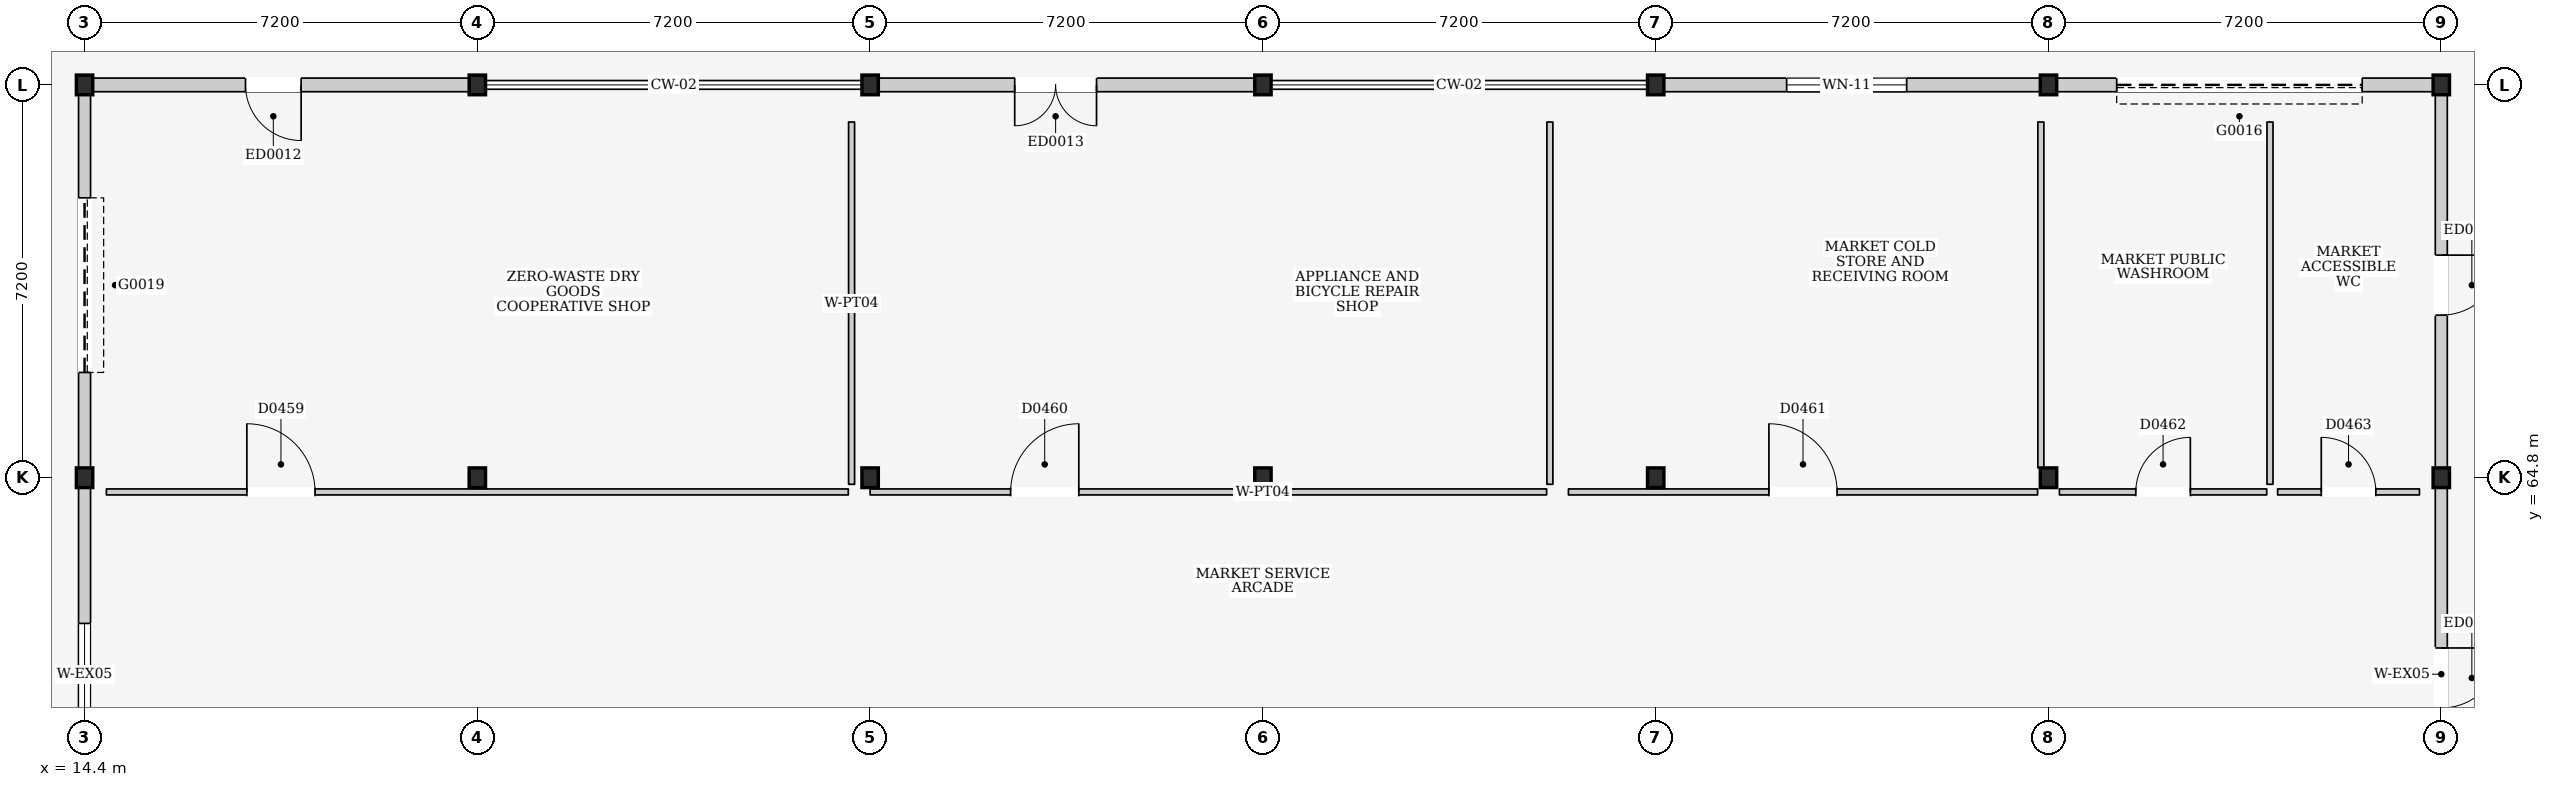
"""IFC4 building model, lengths in metres.
Left out: names, types, materials, properties, quantities, classifications, styles, units other than length and angle.
Written with IfcOpenShell. Run it as: python <this file> out.ifc"""

import sys

from ifc_helpers import new_model, si_unit, direction, frame, frame_2d, origin, origin_2d, place, context, subcontext, project, spatial, rectangle, i_section, extrude, element, fill, save


model = new_model("IFC4")
c1 = context("Model", 3, precision=1e-05, world=origin(), true_north=direction((0.0, 1.0)))
c2 = subcontext(c1, "Body", "Model", "MODEL_VIEW")
j1 = project(units=[si_unit("LENGTHUNIT", "METRE"), si_unit("PLANEANGLEUNIT", "RADIAN")], contexts=[c1])
p1 = place(None, origin())
s1 = spatial("IfcSite", under=j1, at=p1, CompositionType="ELEMENT")
p2 = place(p1, origin())
s2 = spatial("IfcBuilding", under=s1, at=p2, CompositionType="ELEMENT")
p3 = place(p2, origin())
s3 = spatial("IfcBuildingStorey", under=s2, at=p3, CompositionType="ELEMENT", Elevation=0.0)
for number, where, z_axis, x_axis in (
    (1, (14.4, 64.8, 0.0), (0.0, 0.0, 1.0), (1.0, 0.0, 0.0)),
    (2, (14.4, 72.0, 0.0), (0.0, 0.0, 1.0), (1.0, 0.0, 0.0)),
    (3, (21.6, 64.8, 0.0), (0.0, 0.0, 1.0), (1.0, 0.0, 0.0)),
    (4, (21.6, 72.0, 0.0), (0.0, 0.0, 1.0), (1.0, 0.0, 0.0)),
    (5, (28.8, 64.8, 0.0), (0.0, 0.0, 1.0), (1.0, 0.0, 0.0)),
    (6, (28.8, 72.0, 0.0), (0.0, 0.0, 1.0), (1.0, 0.0, 0.0)),
    (7, (36.0, 64.8, 0.0), (0.0, 0.0, 1.0), (1.0, 0.0, 0.0)),
    (8, (36.0, 72.0, 0.0), (0.0, 0.0, 1.0), (1.0, 0.0, 0.0)),
    (9, (43.2, 64.8, 0.0), (0.0, 0.0, 1.0), (1.0, 0.0, 0.0)),
    (10, (43.2, 72.0, 0.0), (0.0, 0.0, 1.0), (1.0, 0.0, 0.0)),
    (11, (50.4, 64.8, 0.0), (0.0, 0.0, 1.0), (1.0, 0.0, 0.0)),
    (12, (50.4, 72.0, 0.0), (0.0, 0.0, 1.0), (1.0, 0.0, 0.0)),
    (13, (57.6, 64.8, 0.0), (0.0, 0.0, 1.0), (1.0, 0.0, 0.0)),
    (14, (57.6, 72.0, 0.0), (0.0, 0.0, 1.0), (1.0, 0.0, 0.0)),
):
    element("IfcColumn", number, at=place(p3, frame(where, z_axis=z_axis, x_axis=x_axis)), inside=s3, PredefinedType="COLUMN", context=c2, shape_type="SweptSolid", body=[
        extrude(i_section(OverallWidth=0.3, OverallDepth=0.36, WebThickness=0.012, FlangeThickness=0.022, at=origin_2d()), origin(), (0.0, 0.0, 1.0), 4.5),
    ])
p4 = place(p3, frame((14.55, 72.0, 0.0), z_axis=(0.0, 0.0, 1.0), x_axis=(1.0, 0.0, 0.0)))
e15 = element("IfcWall", 15, at=p4, inside=s3, PredefinedType="SOLIDWALL", context=c2, shape_type="SweptSolid", body=[
    extrude(rectangle(XDim=6.9, YDim=0.25, at=frame_2d((3.45, 0.0))), origin(), (0.0, 0.0, 1.0), 3.55),
])
p5 = place(p4, frame((2.8, 0.0, 0.0)))
e16 = element("IfcOpeningElement", 16, at=p5, cuts=e15, PredefinedType="OPENING", context=c2, shape_type="SweptSolid", body=[
    extrude(rectangle(XDim=1.02, YDim=2.1, at=frame_2d((0.51, 1.05))), frame((0.0, 0.14, 0.0), z_axis=(0.0, -1.0, 0.0), x_axis=(1.0, 0.0, 0.0)), (0.0, 0.0, 1.0), 0.28),
])
p6 = place(p3, frame((28.95, 72.0, 0.0), z_axis=(0.0, 0.0, 1.0), x_axis=(1.0, 0.0, 0.0)))
e17 = element("IfcWall", 17, at=p6, inside=s3, PredefinedType="SOLIDWALL", context=c2, shape_type="SweptSolid", body=[
    extrude(rectangle(XDim=6.9, YDim=0.25, at=frame_2d((3.45, 0.0))), origin(), (0.0, 0.0, 1.0), 3.55),
])
p7 = place(p6, frame((2.5, 0.0, 0.0)))
e18 = element("IfcOpeningElement", 18, at=p7, cuts=e17, PredefinedType="OPENING", context=c2, shape_type="SweptSolid", body=[
    extrude(rectangle(XDim=1.5, YDim=2.2, at=frame_2d((0.75, 1.1))), frame((0.0, 0.14, 0.0), z_axis=(0.0, -1.0, 0.0), x_axis=(1.0, 0.0, 0.0)), (0.0, 0.0, 1.0), 0.28),
])
p8 = place(p3, frame((43.35, 72.0, 0.0), z_axis=(0.0, 0.0, 1.0), x_axis=(1.0, 0.0, 0.0)))
e19 = element("IfcWall", 19, at=p8, inside=s3, PredefinedType="SOLIDWALL", context=c2, shape_type="SweptSolid", body=[
    extrude(rectangle(XDim=6.9, YDim=0.25, at=frame_2d((3.45, 0.0))), origin(), (0.0, 0.0, 1.0), 3.55),
])
p9 = place(p8, frame((2.25, 0.0, 0.9)))
e20 = element("IfcOpeningElement", 20, at=p9, cuts=e19, PredefinedType="OPENING", context=c2, shape_type="SweptSolid", body=[
    extrude(rectangle(XDim=2.2, YDim=1.8, at=frame_2d((1.1, 0.9))), frame((0.0, 0.14, 0.0), z_axis=(0.0, -1.0, 0.0), x_axis=(1.0, 0.0, 0.0)), (0.0, 0.0, 1.0), 0.28),
])
p10 = place(p3, frame((50.55, 72.0, 0.0), z_axis=(0.0, 0.0, 1.0), x_axis=(1.0, 0.0, 0.0)))
e21 = element("IfcWall", 21, at=p10, inside=s3, PredefinedType="SOLIDWALL", context=c2, shape_type="SweptSolid", body=[
    extrude(rectangle(XDim=6.9, YDim=0.25, at=frame_2d((3.45, 0.0))), origin(), (0.0, 0.0, 1.0), 3.55),
])
p11 = place(p10, frame((1.1, 0.0, 0.0)))
e22 = element("IfcOpeningElement", 22, at=p11, cuts=e21, PredefinedType="OPENING", context=c2, shape_type="SweptSolid", body=[
    extrude(rectangle(XDim=4.5, YDim=3.2, at=frame_2d((2.25, 1.6))), frame((0.0, 0.14, 0.0), z_axis=(0.0, -1.0, 0.0), x_axis=(1.0, 0.0, 0.0)), (0.0, 0.0, 1.0), 0.28),
])
p12 = place(p3, frame((14.4, 57.78, 0.0), z_axis=(0.0, 0.0, 1.0), x_axis=(0.0, 1.0, 0.0)))
e23 = element("IfcWall", 23, at=p12, inside=s3, PredefinedType="ELEMENTEDWALL", context=c2, shape_type="SweptSolid", body=[
    extrude(rectangle(XDim=6.84, YDim=0.22, at=frame_2d((3.42, 0.0))), origin(), (0.0, 0.0, 1.0), 3.585),
])
p13 = place(p12, frame((2.35, 0.0, 0.95)))
e24 = element("IfcOpeningElement", 24, at=p13, cuts=e23, PredefinedType="OPENING", context=c2, shape_type="SweptSolid", body=[
    extrude(rectangle(XDim=2.0, YDim=1.5, at=frame_2d((1.0, 0.75))), frame((0.0, 0.125, 0.0), z_axis=(0.0, -1.0, 0.0), x_axis=(1.0, 0.0, 0.0)), (0.0, 0.0, 1.0), 0.25),
])
p14 = place(p3, frame((57.6, 57.78, 0.0), z_axis=(0.0, 0.0, 1.0), x_axis=(0.0, 1.0, 0.0)))
e25 = element("IfcWall", 25, at=p14, inside=s3, PredefinedType="ELEMENTEDWALL", context=c2, shape_type="SweptSolid", body=[
    extrude(rectangle(XDim=6.84, YDim=0.22, at=frame_2d((3.42, 0.0))), origin(), (0.0, 0.0, 1.0), 3.585),
])
p15 = place(p14, frame((2.8, 0.0, 0.0)))
e26 = element("IfcOpeningElement", 26, at=p15, cuts=e25, PredefinedType="OPENING", context=c2, shape_type="SweptSolid", body=[
    extrude(rectangle(XDim=1.1, YDim=2.2, at=frame_2d((0.55, 1.1))), frame((0.0, 0.125, 0.0), z_axis=(0.0, -1.0, 0.0), x_axis=(1.0, 0.0, 0.0)), (0.0, 0.0, 1.0), 0.25),
])
p16 = place(p3, frame((14.4, 64.98, 0.0), z_axis=(0.0, 0.0, 1.0), x_axis=(0.0, 1.0, 0.0)))
e27 = element("IfcWall", 27, at=p16, inside=s3, PredefinedType="ELEMENTEDWALL", context=c2, shape_type="SweptSolid", body=[
    extrude(rectangle(XDim=6.84, YDim=0.22, at=frame_2d((3.42, 0.0))), origin(), (0.0, 0.0, 1.0), 3.585),
])
p17 = place(p16, frame((1.75, 0.0, 0.0)))
e28 = element("IfcOpeningElement", 28, at=p17, cuts=e27, PredefinedType="OPENING", context=c2, shape_type="SweptSolid", body=[
    extrude(rectangle(XDim=3.2, YDim=2.8, at=frame_2d((1.6, 1.4))), frame((0.0, 0.125, 0.0), z_axis=(0.0, -1.0, 0.0), x_axis=(1.0, 0.0, 0.0)), (0.0, 0.0, 1.0), 0.25),
])
p18 = place(p3, frame((57.6, 64.98, 0.0), z_axis=(0.0, 0.0, 1.0), x_axis=(0.0, 1.0, 0.0)))
e29 = element("IfcWall", 29, at=p18, inside=s3, PredefinedType="ELEMENTEDWALL", context=c2, shape_type="SweptSolid", body=[
    extrude(rectangle(XDim=6.84, YDim=0.22, at=frame_2d((3.42, 0.0))), origin(), (0.0, 0.0, 1.0), 3.585),
])
p19 = place(p18, frame((2.8, 0.0, 0.0)))
e30 = element("IfcOpeningElement", 30, at=p19, cuts=e29, PredefinedType="OPENING", context=c2, shape_type="SweptSolid", body=[
    extrude(rectangle(XDim=1.1, YDim=2.2, at=frame_2d((0.55, 1.1))), frame((0.0, 0.125, 0.0), z_axis=(0.0, -1.0, 0.0), x_axis=(1.0, 0.0, 0.0)), (0.0, 0.0, 1.0), 0.25),
])
p20 = place(p3, frame((14.8, 64.54, 0.0), z_axis=(0.0, 0.0, 1.0), x_axis=(1.0, 0.0, 0.0)))
e31 = element("IfcWall", 31, at=p20, inside=s3, PredefinedType="PARTITIONING", context=c2, shape_type="SweptSolid", body=[
    extrude(rectangle(XDim=13.6, YDim=0.11, at=frame_2d((6.8, 0.0))), origin(), (0.0, 0.0, 1.0), 4.2),
])
p21 = place(p20, frame((2.575, 0.0, 0.0)))
e32 = element("IfcOpeningElement", 32, at=p21, cuts=e31, PredefinedType="OPENING", context=c2, shape_type="SweptSolid", body=[
    extrude(rectangle(XDim=1.25, YDim=2.25, at=frame_2d((0.625, 1.125))), frame((0.0, 0.07, 0.0), z_axis=(0.0, -1.0, 0.0), x_axis=(1.0, 0.0, 0.0)), (0.0, 0.0, 1.0), 0.14),
])
p22 = place(p3, frame((28.46, 64.68, 0.0), z_axis=(0.0, 0.0, 1.0), x_axis=(0.0, 1.0, 0.0)))
e33 = element("IfcWall", 33, at=p22, inside=s3, PredefinedType="PARTITIONING", context=c2, shape_type="SweptSolid", body=[
    extrude(rectangle(XDim=6.64, YDim=0.11, at=frame_2d((3.32, 0.0))), origin(), (0.0, 0.0, 1.0), 4.2),
])
p23 = place(p3, frame((28.8, 64.54, 0.0), z_axis=(0.0, 0.0, 1.0), x_axis=(1.0, 0.0, 0.0)))
e34 = element("IfcWall", 34, at=p23, inside=s3, PredefinedType="PARTITIONING", context=c2, shape_type="SweptSolid", body=[
    extrude(rectangle(XDim=12.4, YDim=0.11, at=frame_2d((6.2, 0.0))), origin(), (0.0, 0.0, 1.0), 4.2),
])
p24 = place(p23, frame((2.575, 0.0, 0.0)))
e35 = element("IfcOpeningElement", 35, at=p24, cuts=e34, PredefinedType="OPENING", context=c2, shape_type="SweptSolid", body=[
    extrude(rectangle(XDim=1.25, YDim=2.25, at=frame_2d((0.625, 1.125))), frame((0.0, 0.07, 0.0), z_axis=(0.0, -1.0, 0.0), x_axis=(1.0, 0.0, 0.0)), (0.0, 0.0, 1.0), 0.14),
])
p25 = place(p3, frame((41.26, 64.68, 0.0), z_axis=(0.0, 0.0, 1.0), x_axis=(0.0, 1.0, 0.0)))
e36 = element("IfcWall", 36, at=p25, inside=s3, PredefinedType="PARTITIONING", context=c2, shape_type="SweptSolid", body=[
    extrude(rectangle(XDim=6.64, YDim=0.11, at=frame_2d((3.32, 0.0))), origin(), (0.0, 0.0, 1.0), 4.2),
])
p26 = place(p3, frame((41.6, 64.54, 0.0), z_axis=(0.0, 0.0, 1.0), x_axis=(1.0, 0.0, 0.0)))
e37 = element("IfcWall", 37, at=p26, inside=s3, PredefinedType="PARTITIONING", context=c2, shape_type="SweptSolid", body=[
    extrude(rectangle(XDim=8.6, YDim=0.11, at=frame_2d((4.3, 0.0))), origin(), (0.0, 0.0, 1.0), 4.2),
])
p27 = place(p26, frame((3.675, 0.0, 0.0)))
e38 = element("IfcOpeningElement", 38, at=p27, cuts=e37, PredefinedType="OPENING", context=c2, shape_type="SweptSolid", body=[
    extrude(rectangle(XDim=1.25, YDim=2.25, at=frame_2d((0.625, 1.125))), frame((0.0, 0.07, 0.0), z_axis=(0.0, -1.0, 0.0), x_axis=(1.0, 0.0, 0.0)), (0.0, 0.0, 1.0), 0.14),
])
p28 = place(p3, frame((50.26, 64.98, 0.0), z_axis=(0.0, 0.0, 1.0), x_axis=(0.0, 1.0, 0.0)))
e39 = element("IfcWall", 39, at=p28, inside=s3, PredefinedType="PARTITIONING", context=c2, shape_type="SweptSolid", body=[
    extrude(rectangle(XDim=6.34, YDim=0.11, at=frame_2d((3.17, 0.0))), origin(), (0.0, 0.0, 1.0), 3.585),
])
p29 = place(p3, frame((50.6, 64.54, 0.0), z_axis=(0.0, 0.0, 1.0), x_axis=(1.0, 0.0, 0.0)))
e40 = element("IfcWall", 40, at=p29, inside=s3, PredefinedType="PARTITIONING", context=c2, shape_type="SweptSolid", body=[
    extrude(rectangle(XDim=3.8, YDim=0.11, at=frame_2d((1.9, 0.0))), origin(), (0.0, 0.0, 1.0), 4.2),
])
p30 = place(p29, frame((1.4, 0.0, 0.0)))
e41 = element("IfcOpeningElement", 41, at=p30, cuts=e40, PredefinedType="OPENING", context=c2, shape_type="SweptSolid", body=[
    extrude(rectangle(XDim=1.0, YDim=2.1, at=frame_2d((0.5, 1.05))), frame((0.0, 0.07, 0.0), z_axis=(0.0, -1.0, 0.0), x_axis=(1.0, 0.0, 0.0)), (0.0, 0.0, 1.0), 0.14),
])
p31 = place(p3, frame((54.46, 64.68, 0.0), z_axis=(0.0, 0.0, 1.0), x_axis=(0.0, 1.0, 0.0)))
e42 = element("IfcWall", 42, at=p31, inside=s3, PredefinedType="PARTITIONING", context=c2, shape_type="SweptSolid", body=[
    extrude(rectangle(XDim=6.64, YDim=0.11, at=frame_2d((3.32, 0.0))), origin(), (0.0, 0.0, 1.0), 4.2),
])
p32 = place(p3, frame((54.6, 64.54, 0.0), z_axis=(0.0, 0.0, 1.0), x_axis=(1.0, 0.0, 0.0)))
e43 = element("IfcWall", 43, at=p32, inside=s3, PredefinedType="PARTITIONING", context=c2, shape_type="SweptSolid", body=[
    extrude(rectangle(XDim=2.6, YDim=0.11, at=frame_2d((1.3, 0.0))), origin(), (0.0, 0.0, 1.0), 4.2),
])
p33 = place(p32, frame((0.8, 0.0, 0.0)))
e44 = element("IfcOpeningElement", 44, at=p33, cuts=e43, PredefinedType="OPENING", context=c2, shape_type="SweptSolid", body=[
    extrude(rectangle(XDim=1.0, YDim=2.1, at=frame_2d((0.5, 1.05))), frame((0.0, 0.07, 0.0), z_axis=(0.0, -1.0, 0.0), x_axis=(1.0, 0.0, 0.0)), (0.0, 0.0, 1.0), 0.14),
])
p34 = place(p5, frame((1.02, 0.0, 0.0), z_axis=(0.0, 0.0, 1.0), x_axis=(-1.0, 0.0, 0.0)))
e45 = element("IfcDoor", 45, at=p34, inside=s3, OperationType="SINGLE_SWING_LEFT", PredefinedType="DOOR", context=c2, shape_type="SweptSolid", body=[
    extrude(rectangle(XDim=1.02, YDim=2.1, at=frame_2d((0.51, 1.05))), frame((0.0, 0.025, 0.0), z_axis=(0.0, -1.0, 0.0), x_axis=(1.0, 0.0, 0.0)), (0.0, 0.0, 1.0), 0.05),
])
fill(e16, e45)
p35 = place(p7, frame((1.5, 0.0, 0.0), z_axis=(0.0, 0.0, 1.0), x_axis=(-1.0, 0.0, 0.0)))
e46 = element("IfcDoor", 46, at=p35, inside=s3, OperationType="DOUBLE_DOOR_SINGLE_SWING", PredefinedType="DOOR", context=c2, shape_type="SweptSolid", body=[
    extrude(rectangle(XDim=1.5, YDim=2.2, at=frame_2d((0.75, 1.1))), frame((0.0, 0.025, 0.0), z_axis=(0.0, -1.0, 0.0), x_axis=(1.0, 0.0, 0.0)), (0.0, 0.0, 1.0), 0.05),
])
fill(e18, e46)
p36 = place(p9, origin())
e47 = element("IfcWindow", 47, at=p36, inside=s3, PartitioningType="TRIPLE_PANEL_VERTICAL", PredefinedType="WINDOW", context=c2, shape_type="SweptSolid", body=[
    extrude(rectangle(XDim=2.2, YDim=1.8, at=frame_2d((1.1, 0.9))), frame((0.0, 0.03, 0.0), z_axis=(0.0, -1.0, 0.0), x_axis=(1.0, 0.0, 0.0)), (0.0, 0.0, 1.0), 0.06),
])
fill(e20, e47)
p37 = place(p11, frame((4.5, 0.0, 0.0), z_axis=(0.0, 0.0, 1.0), x_axis=(-1.0, 0.0, 0.0)))
e48 = element("IfcDoor", 48, at=p37, inside=s3, OperationType="ROLLINGUP", PredefinedType="GATE", context=c2, shape_type="SweptSolid", body=[
    extrude(rectangle(XDim=4.5, YDim=3.2, at=frame_2d((2.25, 1.6))), frame((0.0, 0.025, 0.0), z_axis=(0.0, -1.0, 0.0), x_axis=(1.0, 0.0, 0.0)), (0.0, 0.0, 1.0), 0.05),
])
fill(e22, e48)
p38 = place(p13, origin())
e49 = element("IfcWindow", 49, at=p38, inside=s3, PartitioningType="DOUBLE_PANEL_VERTICAL", PredefinedType="WINDOW", context=c2, shape_type="SweptSolid", body=[
    extrude(rectangle(XDim=2.0, YDim=1.5, at=frame_2d((1.0, 0.75))), frame((0.0, 0.03, 0.0), z_axis=(0.0, -1.0, 0.0), x_axis=(1.0, 0.0, 0.0)), (0.0, 0.0, 1.0), 0.06),
])
fill(e24, e49)
p39 = place(p15, frame((1.1, 0.0, 0.0), z_axis=(0.0, 0.0, 1.0), x_axis=(-1.0, 0.0, 0.0)))
e50 = element("IfcDoor", 50, at=p39, inside=s3, OperationType="SINGLE_SWING_LEFT", PredefinedType="DOOR", context=c2, shape_type="SweptSolid", body=[
    extrude(rectangle(XDim=1.1, YDim=2.2, at=frame_2d((0.55, 1.1))), frame((0.0, 0.025, 0.0), z_axis=(0.0, -1.0, 0.0), x_axis=(1.0, 0.0, 0.0)), (0.0, 0.0, 1.0), 0.05),
])
fill(e26, e50)
p40 = place(p17, frame((3.2, 0.0, 0.0), z_axis=(0.0, 0.0, 1.0), x_axis=(-1.0, 0.0, 0.0)))
e51 = element("IfcDoor", 51, at=p40, inside=s3, OperationType="ROLLINGUP", PredefinedType="GATE", context=c2, shape_type="SweptSolid", body=[
    extrude(rectangle(XDim=3.2, YDim=2.8, at=frame_2d((1.6, 1.4))), frame((0.0, 0.025, 0.0), z_axis=(0.0, -1.0, 0.0), x_axis=(1.0, 0.0, 0.0)), (0.0, 0.0, 1.0), 0.05),
])
fill(e28, e51)
p41 = place(p19, frame((1.1, 0.0, 0.0), z_axis=(0.0, 0.0, 1.0), x_axis=(-1.0, 0.0, 0.0)))
e52 = element("IfcDoor", 52, at=p41, inside=s3, OperationType="SINGLE_SWING_LEFT", PredefinedType="DOOR", context=c2, shape_type="SweptSolid", body=[
    extrude(rectangle(XDim=1.1, YDim=2.2, at=frame_2d((0.55, 1.1))), frame((0.0, 0.025, 0.0), z_axis=(0.0, -1.0, 0.0), x_axis=(1.0, 0.0, 0.0)), (0.0, 0.0, 1.0), 0.05),
])
fill(e30, e52)
p42 = place(p21, origin())
e53 = element("IfcDoor", 53, at=p42, inside=s3, OperationType="SINGLE_SWING_LEFT", PredefinedType="DOOR", context=c2, shape_type="SweptSolid", body=[
    extrude(rectangle(XDim=1.25, YDim=2.25, at=frame_2d((0.625, 1.125))), frame((0.0, 0.025, 0.0), z_axis=(0.0, -1.0, 0.0), x_axis=(1.0, 0.0, 0.0)), (0.0, 0.0, 1.0), 0.05),
])
fill(e32, e53)
p43 = place(p24, origin())
e54 = element("IfcDoor", 54, at=p43, inside=s3, OperationType="SINGLE_SWING_RIGHT", PredefinedType="DOOR", context=c2, shape_type="SweptSolid", body=[
    extrude(rectangle(XDim=1.25, YDim=2.25, at=frame_2d((0.625, 1.125))), frame((0.0, 0.025, 0.0), z_axis=(0.0, -1.0, 0.0), x_axis=(1.0, 0.0, 0.0)), (0.0, 0.0, 1.0), 0.05),
])
fill(e35, e54)
p44 = place(p27, origin())
e55 = element("IfcDoor", 55, at=p44, inside=s3, OperationType="SINGLE_SWING_LEFT", PredefinedType="DOOR", context=c2, shape_type="SweptSolid", body=[
    extrude(rectangle(XDim=1.25, YDim=2.25, at=frame_2d((0.625, 1.125))), frame((0.0, 0.025, 0.0), z_axis=(0.0, -1.0, 0.0), x_axis=(1.0, 0.0, 0.0)), (0.0, 0.0, 1.0), 0.05),
])
fill(e38, e55)
p45 = place(p30, origin())
e56 = element("IfcDoor", 56, at=p45, inside=s3, OperationType="SINGLE_SWING_RIGHT", PredefinedType="DOOR", context=c2, shape_type="SweptSolid", body=[
    extrude(rectangle(XDim=1.0, YDim=2.1, at=frame_2d((0.5, 1.05))), frame((0.0, 0.025, 0.0), z_axis=(0.0, -1.0, 0.0), x_axis=(1.0, 0.0, 0.0)), (0.0, 0.0, 1.0), 0.05),
])
fill(e41, e56)
p46 = place(p33, origin())
e57 = element("IfcDoor", 57, at=p46, inside=s3, OperationType="SINGLE_SWING_LEFT", PredefinedType="DOOR", context=c2, shape_type="SweptSolid", body=[
    extrude(rectangle(XDim=1.0, YDim=2.1, at=frame_2d((0.5, 1.05))), frame((0.0, 0.025, 0.0), z_axis=(0.0, -1.0, 0.0), x_axis=(1.0, 0.0, 0.0)), (0.0, 0.0, 1.0), 0.05),
])
fill(e44, e57)
save(model, sys.argv[1])
